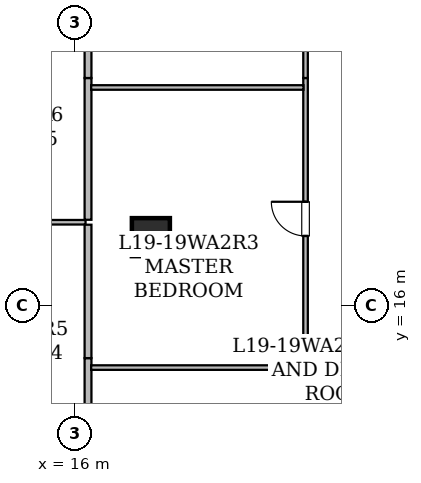
"""IFC4 building model, lengths in metres.
Left out: names, types, materials, properties, quantities, classifications, styles, units other than length and angle.
Written with IfcOpenShell. Run it as: python <this file> out.ifc"""

import sys

from ifc_helpers import new_model, si_unit, direction, frame, frame_2d, origin, origin_2d, place, context, subcontext, project, spatial, rectangle, hollow_rectangle, extrude, element, fill, save


model = new_model("IFC4")
c1 = context("Model", 3, precision=1e-05, world=origin(), true_north=direction((0.0, 1.0)))
c2 = subcontext(c1, "Body", "Model", "MODEL_VIEW")
j1 = project(units=[si_unit("LENGTHUNIT", "METRE"), si_unit("PLANEANGLEUNIT", "RADIAN")], contexts=[c1])
p1 = place(None, origin())
s1 = spatial("IfcSite", under=j1, at=p1, CompositionType="ELEMENT")
p2 = place(p1, origin())
s2 = spatial("IfcBuilding", under=s1, at=p2, CompositionType="ELEMENT")
p3 = place(p2, frame((0.0, 0.0, 77.1)))
s3 = spatial("IfcBuildingStorey", under=s2, at=p3, CompositionType="ELEMENT", Elevation=77.1)
p4 = place(p3, frame((18.0, 17.8, 0.0), z_axis=(0.0, 0.0, 1.0), x_axis=(1.0, 0.0, 0.0)))
e1 = element("IfcColumn", 1, at=p4, inside=s3, PredefinedType="COLUMN", context=c2, shape_type="SweptSolid", body=[
    extrude(hollow_rectangle(XDim=1.0, YDim=1.0, WallThickness=0.05, at=origin_2d()), origin(), (0.0, 0.0, 1.0), 3.65),
])
p5 = place(p3, frame((11.035, 18.192, 0.0), z_axis=(0.0, 0.0, 1.0), x_axis=(1.0, 0.0, 0.0)))
e2 = element("IfcWall", 2, at=p5, inside=s3, PredefinedType="PARTITIONING", context=c2, shape_type="SweptSolid", body=[
    extrude(rectangle(XDim=5.246, YDim=0.12, at=frame_2d((2.623, 0.0))), origin(), (0.0, 0.0, 1.0), 3.43),
])
p6 = place(p3, frame((16.346, 14.617, 0.0), z_axis=(0.0, 0.0, 1.0), x_axis=(0.0, -1.0, 0.0)))
e3 = element("IfcWall", 3, at=p6, inside=s3, PredefinedType="STANDARD", context=c2, shape_type="SweptSolid", body=[
    extrude(rectangle(XDim=2.03, YDim=0.18, at=frame_2d((1.015, 0.0))), origin(), (0.0, 0.0, 1.0), 2.647),
])
p7 = place(p3, frame((16.346, 18.127, 0.0), z_axis=(0.0, 0.0, 1.0), x_axis=(0.0, -1.0, 0.0)))
e4 = element("IfcWall", 4, at=p7, inside=s3, PredefinedType="STANDARD", context=c2, shape_type="SweptSolid", body=[
    extrude(rectangle(XDim=3.51, YDim=0.18, at=frame_2d((1.755, 0.0))), origin(), (0.0, 0.0, 1.0), 2.647),
])
p8 = place(p3, frame((16.346, 21.987, 0.0), z_axis=(0.0, 0.0, 1.0), x_axis=(0.0, -1.0, 0.0)))
e5 = element("IfcWall", 5, at=p8, inside=s3, PredefinedType="STANDARD", context=c2, shape_type="SweptSolid", body=[
    extrude(rectangle(XDim=3.73, YDim=0.18, at=frame_2d((1.865, 0.0))), origin(), (0.0, 0.0, 1.0), 3.43),
])
p9 = place(p3, frame((16.346, 25.11, 0.0), z_axis=(0.0, 0.0, 1.0), x_axis=(0.0, -1.0, 0.0)))
e6 = element("IfcWall", 6, at=p9, inside=s3, PredefinedType="STANDARD", context=c2, shape_type="SweptSolid", body=[
    extrude(rectangle(XDim=3.123, YDim=0.18, at=frame_2d((1.562, 0.0))), origin(), (0.0, 0.0, 1.0), 2.961),
])
p10 = place(p3, frame((22.07, 8.407, 0.0), z_axis=(0.0, 0.0, 1.0), x_axis=(0.0, 1.0, 0.0)))
e7 = element("IfcWall", 7, at=p10, inside=s3, PredefinedType="PARTITIONING", context=c2, shape_type="SweptSolid", body=[
    extrude(rectangle(XDim=6.21, YDim=0.12, at=frame_2d((3.105, 0.0))), origin(), (0.0, 0.0, 1.0), 3.43),
])
p11 = place(p10, frame((2.634, 0.0, 0.0)))
e8 = element("IfcOpeningElement", 8, at=p11, cuts=e7, PredefinedType="OPENING", context=c2, shape_type="SweptSolid", body=[
    extrude(rectangle(XDim=0.9, YDim=2.1, at=frame_2d((0.45, 1.05))), frame((0.0, 0.07, 0.0), z_axis=(0.0, -1.0, 0.0), x_axis=(1.0, 0.0, 0.0)), (0.0, 0.0, 1.0), 0.14),
])
p12 = place(p3, frame((22.07, 14.617, 0.0), z_axis=(0.0, 0.0, 1.0), x_axis=(0.0, 1.0, 0.0)))
e9 = element("IfcWall", 9, at=p12, inside=s3, PredefinedType="PARTITIONING", context=c2, shape_type="SweptSolid", body=[
    extrude(rectangle(XDim=7.37, YDim=0.12, at=frame_2d((3.685, 0.0))), origin(), (0.0, 0.0, 1.0), 2.647),
])
p13 = place(p12, frame((3.214, 0.0, 0.0)))
e10 = element("IfcOpeningElement", 10, at=p13, cuts=e9, PredefinedType="OPENING", context=c2, shape_type="SweptSolid", body=[
    extrude(rectangle(XDim=0.9, YDim=2.1, at=frame_2d((0.45, 1.05))), frame((0.0, 0.07, 0.0), z_axis=(0.0, -1.0, 0.0), x_axis=(1.0, 0.0, 0.0)), (0.0, 0.0, 1.0), 0.14),
])
p14 = place(p3, frame((22.07, 21.987, 0.0), z_axis=(0.0, 0.0, 1.0), x_axis=(0.0, 1.0, 0.0)))
e11 = element("IfcWall", 11, at=p14, inside=s3, PredefinedType="PARTITIONING", context=c2, shape_type="SweptSolid", body=[
    extrude(rectangle(XDim=8.283, YDim=0.12, at=frame_2d((4.142, 0.0))), origin(), (0.0, 0.0, 1.0), 2.961),
])
p15 = place(p14, frame((3.691, 0.0, 0.0)))
e12 = element("IfcOpeningElement", 12, at=p15, cuts=e11, PredefinedType="OPENING", context=c2, shape_type="SweptSolid", body=[
    extrude(rectangle(XDim=0.9, YDim=2.1, at=frame_2d((0.45, 1.05))), frame((0.0, 0.07, 0.0), z_axis=(0.0, -1.0, 0.0), x_axis=(1.0, 0.0, 0.0)), (0.0, 0.0, 1.0), 0.14),
])
for number, where, z_axis, x_axis in (
    (13, (16.428, 14.368, 0.0), (0.0, 0.0, 1.0), (1.0, 0.0, 0.0)),
    (14, (16.428, 21.738, 0.0), (0.0, 0.0, 1.0), (1.0, 0.0, 0.0)),
):
    element("IfcWall", number, at=place(p3, frame(where, z_axis=z_axis, x_axis=x_axis)), inside=s3, PredefinedType="PARTITIONING", context=c2, shape_type="SweptSolid", body=[
        extrude(rectangle(XDim=5.588, YDim=0.12, at=frame_2d((2.794, 0.0))), origin(), (0.0, 0.0, 1.0), 2.647),
    ])
p16 = place(p13, origin())
e15 = element("IfcDoor", 15, at=p16, inside=s3, OperationType="SINGLE_SWING_RIGHT", PredefinedType="DOOR", context=c2, shape_type="SweptSolid", body=[
    extrude(rectangle(XDim=0.9, YDim=2.1, at=frame_2d((0.45, 1.05))), frame((0.0, 0.025, 0.0), z_axis=(0.0, -1.0, 0.0), x_axis=(1.0, 0.0, 0.0)), (0.0, 0.0, 1.0), 0.05),
])
fill(e10, e15)
save(model, sys.argv[1])
